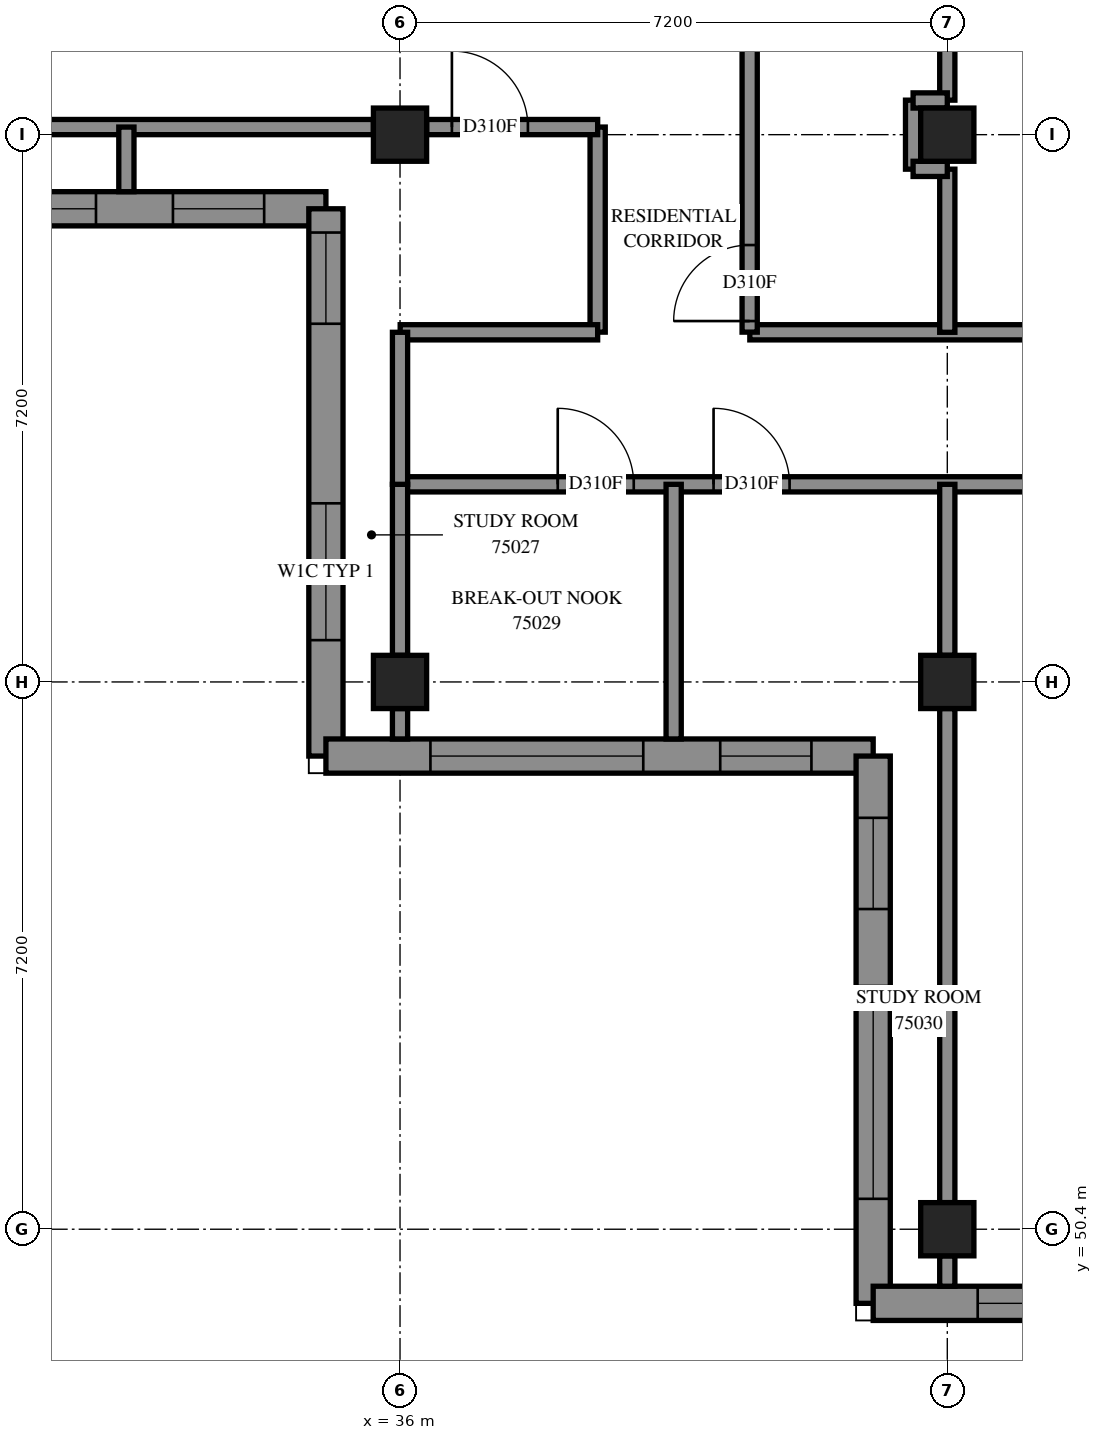
"""IFC4 building model, lengths in metres.
Left out: names, types, materials, properties, quantities, classifications, styles, units other than length and angle.
Written with IfcOpenShell. Run it as: python <this file> out.ifc"""

import sys

from ifc_helpers import new_model, si_unit, direction, frame, frame_2d, origin, origin_2d, place, context, subcontext, project, spatial, polyline, rectangle, outline, extrude, element, fill, save


model = new_model("IFC4")
c1 = context("Model", 3, precision=1e-05, world=origin(), true_north=direction((0.0, 1.0)))
c2 = subcontext(c1, "Body", "Model", "MODEL_VIEW")
j1 = project(units=[si_unit("LENGTHUNIT", "METRE"), si_unit("PLANEANGLEUNIT", "RADIAN")], contexts=[c1])
p1 = place(None, origin())
s1 = spatial("IfcSite", under=j1, at=p1, CompositionType="ELEMENT")
p2 = place(p1, origin())
s2 = spatial("IfcBuilding", under=s1, at=p2, CompositionType="ELEMENT")
p3 = place(p2, frame((0.0, 0.0, 274.4)))
s3 = spatial("IfcBuildingStorey", under=s2, at=p3, CompositionType="ELEMENT", Elevation=274.4)
for number, where, z_axis, x_axis in (
    (1, (36.0, 57.6, 0.0), (0.0, 0.0, 1.0), (1.0, 0.0, 0.0)),
    (2, (36.0, 64.8, 0.0), (0.0, 0.0, 1.0), (1.0, 0.0, 0.0)),
    (3, (43.2, 50.4, 0.0), (0.0, 0.0, 1.0), (1.0, 0.0, 0.0)),
    (4, (43.2, 57.6, 0.0), (0.0, 0.0, 1.0), (1.0, 0.0, 0.0)),
    (5, (43.2, 64.8, 0.0), (0.0, 0.0, 1.0), (1.0, 0.0, 0.0)),
):
    element("IfcColumn", number, at=place(p3, frame(where, z_axis=z_axis, x_axis=x_axis)), inside=s3, PredefinedType="COLUMN", context=c2, shape_type="SweptSolid", body=[
        extrude(rectangle(XDim=0.7, YDim=0.7, at=origin_2d()), origin(), (0.0, 0.0, 1.0), 3.1),
    ])
p4 = place(p3, frame((26.653, 63.825, 0.0), z_axis=(0.0, 0.0, 1.0), x_axis=(1.0, 0.0, 0.0)))
e6 = element("IfcWall", 6, at=p4, inside=s3, PredefinedType="SOLIDWALL", context=c2, shape_type="SweptSolid", body=[
    extrude(outline(polyline([(-0.225, -0.225), (8.147, -0.225), (8.597, 0.225), (0.225, 0.225), (-0.225, -0.225)])), origin(), (0.0, 0.0, 1.0), 3.1),
])
p5 = place(p4, frame((2.547, 0.0, 0.45)))
e7 = element("IfcOpeningElement", 7, at=p5, cuts=e6, PredefinedType="OPENING", context=c2, shape_type="SweptSolid", body=[
    extrude(rectangle(XDim=2.8, YDim=2.55, at=frame_2d((1.4, 1.275))), frame((0.0, 0.235, 0.0), z_axis=(0.0, -1.0, 0.0), x_axis=(1.0, 0.0, 0.0)), (0.0, 0.0, 1.0), 0.47),
])
p6 = place(p4, frame((0.686, 0.0, 0.45)))
e8 = element("IfcOpeningElement", 8, at=p6, cuts=e6, PredefinedType="OPENING", context=c2, shape_type="SweptSolid", body=[
    extrude(rectangle(XDim=1.2, YDim=2.55, at=frame_2d((0.6, 1.275))), frame((0.0, 0.235, 0.0), z_axis=(0.0, -1.0, 0.0), x_axis=(1.0, 0.0, 0.0)), (0.0, 0.0, 1.0), 0.47),
])
p7 = place(p4, frame((6.359, 0.0, 0.45)))
e9 = element("IfcOpeningElement", 9, at=p7, cuts=e6, PredefinedType="OPENING", context=c2, shape_type="SweptSolid", body=[
    extrude(rectangle(XDim=1.2, YDim=2.55, at=frame_2d((0.6, 1.275))), frame((0.0, 0.235, 0.0), z_axis=(0.0, -1.0, 0.0), x_axis=(1.0, 0.0, 0.0)), (0.0, 0.0, 1.0), 0.47),
])
p8 = place(p3, frame((35.025, 63.825, 0.0), z_axis=(0.0, 0.0, 1.0), x_axis=(0.0, -1.0, 0.0)))
e10 = element("IfcWall", 10, at=p8, inside=s3, PredefinedType="SOLIDWALL", context=c2, shape_type="SweptSolid", body=[
    extrude(outline(polyline([(0.225, -0.225), (7.425, -0.225), (6.975, 0.225), (-0.225, 0.225), (0.225, -0.225)])), origin(), (0.0, 0.0, 1.0), 3.1),
])
p9 = place(p8, frame((0.312, 0.0, 0.45)))
e11 = element("IfcOpeningElement", 11, at=p9, cuts=e10, PredefinedType="OPENING", context=c2, shape_type="SweptSolid", body=[
    extrude(rectangle(XDim=1.2, YDim=2.55, at=frame_2d((0.6, 1.275))), frame((0.0, 0.235, 0.0), z_axis=(0.0, -1.0, 0.0), x_axis=(1.0, 0.0, 0.0)), (0.0, 0.0, 1.0), 0.47),
])
p10 = place(p8, frame((3.875, 0.0, 0.7)))
e12 = element("IfcOpeningElement", 12, at=p10, cuts=e10, PredefinedType="OPENING", context=c2, shape_type="SweptSolid", body=[
    extrude(rectangle(XDim=1.8, YDim=2.3, at=frame_2d((0.9, 1.15))), frame((0.0, 0.235, 0.0), z_axis=(0.0, -1.0, 0.0), x_axis=(1.0, 0.0, 0.0)), (0.0, 0.0, 1.0), 0.47),
])
p11 = place(p3, frame((35.025, 56.625, 0.0), z_axis=(0.0, 0.0, 1.0), x_axis=(1.0, 0.0, 0.0)))
e13 = element("IfcWall", 13, at=p11, inside=s3, PredefinedType="SOLIDWALL", context=c2, shape_type="SweptSolid", body=[
    extrude(outline(polyline([(-0.225, -0.225), (6.975, -0.225), (7.425, 0.225), (0.225, 0.225), (-0.225, -0.225)])), origin(), (0.0, 0.0, 1.0), 3.1),
])
p12 = place(p11, frame((1.375, 0.0, 0.45)))
e14 = element("IfcOpeningElement", 14, at=p12, cuts=e13, PredefinedType="OPENING", context=c2, shape_type="SweptSolid", body=[
    extrude(rectangle(XDim=2.8, YDim=2.55, at=frame_2d((1.4, 1.275))), frame((0.0, 0.235, 0.0), z_axis=(0.0, -1.0, 0.0), x_axis=(1.0, 0.0, 0.0)), (0.0, 0.0, 1.0), 0.47),
])
p13 = place(p11, frame((5.188, 0.0, 0.45)))
e15 = element("IfcOpeningElement", 15, at=p13, cuts=e13, PredefinedType="OPENING", context=c2, shape_type="SweptSolid", body=[
    extrude(rectangle(XDim=1.2, YDim=2.55, at=frame_2d((0.6, 1.275))), frame((0.0, 0.235, 0.0), z_axis=(0.0, -1.0, 0.0), x_axis=(1.0, 0.0, 0.0)), (0.0, 0.0, 1.0), 0.47),
])
p14 = place(p3, frame((42.225, 56.625, 0.0), z_axis=(0.0, 0.0, 1.0), x_axis=(0.0, -1.0, 0.0)))
e16 = element("IfcWall", 16, at=p14, inside=s3, PredefinedType="SOLIDWALL", context=c2, shape_type="SweptSolid", body=[
    extrude(outline(polyline([(0.225, -0.225), (7.425, -0.225), (6.975, 0.225), (-0.225, 0.225), (0.225, -0.225)])), origin(), (0.0, 0.0, 1.0), 3.1),
])
p15 = place(p14, frame((3.025, 0.0, 0.45)))
e17 = element("IfcOpeningElement", 17, at=p15, cuts=e16, PredefinedType="OPENING", context=c2, shape_type="SweptSolid", body=[
    extrude(rectangle(XDim=2.8, YDim=2.55, at=frame_2d((1.4, 1.275))), frame((0.0, 0.235, 0.0), z_axis=(0.0, -1.0, 0.0), x_axis=(1.0, 0.0, 0.0)), (0.0, 0.0, 1.0), 0.47),
])
p16 = place(p14, frame((0.812, 0.0, 0.45)))
e18 = element("IfcOpeningElement", 18, at=p16, cuts=e16, PredefinedType="OPENING", context=c2, shape_type="SweptSolid", body=[
    extrude(rectangle(XDim=1.2, YDim=2.55, at=frame_2d((0.6, 1.275))), frame((0.0, 0.235, 0.0), z_axis=(0.0, -1.0, 0.0), x_axis=(1.0, 0.0, 0.0)), (0.0, 0.0, 1.0), 0.47),
])
p17 = place(p3, frame((42.225, 49.425, 0.0), z_axis=(0.0, 0.0, 1.0), x_axis=(1.0, 0.0, 0.0)))
e19 = element("IfcWall", 19, at=p17, inside=s3, PredefinedType="SOLIDWALL", context=c2, shape_type="SweptSolid", body=[
    extrude(outline(polyline([(-0.225, -0.225), (6.975, -0.225), (7.425, 0.225), (0.225, 0.225), (-0.225, -0.225)])), origin(), (0.0, 0.0, 1.0), 3.1),
])
p18 = place(p17, frame((1.375, 0.0, 0.45)))
e20 = element("IfcOpeningElement", 20, at=p18, cuts=e19, PredefinedType="OPENING", context=c2, shape_type="SweptSolid", body=[
    extrude(rectangle(XDim=2.8, YDim=2.55, at=frame_2d((1.4, 1.275))), frame((0.0, 0.235, 0.0), z_axis=(0.0, -1.0, 0.0), x_axis=(1.0, 0.0, 0.0)), (0.0, 0.0, 1.0), 0.47),
])
p19 = place(p17, frame((5.188, 0.0, 0.45)))
e21 = element("IfcOpeningElement", 21, at=p19, cuts=e19, PredefinedType="OPENING", context=c2, shape_type="SweptSolid", body=[
    extrude(rectangle(XDim=1.2, YDim=2.55, at=frame_2d((0.6, 1.275))), frame((0.0, 0.235, 0.0), z_axis=(0.0, -1.0, 0.0), x_axis=(1.0, 0.0, 0.0)), (0.0, 0.0, 1.0), 0.47),
])
p20 = place(p3, frame((36.0, 60.2, 0.0), z_axis=(0.0, 0.0, 1.0), x_axis=(1.0, 0.0, 0.0)))
e22 = element("IfcWall", 22, at=p20, inside=s3, PredefinedType="PARTITIONING", context=c2, shape_type="SweptSolid", body=[
    extrude(rectangle(XDim=17.0, YDim=0.2, at=frame_2d((8.5, 0.0))), origin(), (0.0, 0.0, 1.0), 3.1),
])
p21 = place(p20, frame((15.802, 0.0, 0.0)))
e23 = element("IfcOpeningElement", 23, at=p21, cuts=e22, PredefinedType="OPENING", context=c2, shape_type="SweptSolid", body=[
    extrude(rectangle(XDim=1.0, YDim=2.1, at=frame_2d((0.5, 1.05))), frame((0.0, 0.11, 0.0), z_axis=(0.0, -1.0, 0.0), x_axis=(1.0, 0.0, 0.0)), (0.0, 0.0, 1.0), 0.22),
])
p22 = place(p20, frame((2.075, 0.0, 0.0)))
e24 = element("IfcOpeningElement", 24, at=p22, cuts=e22, PredefinedType="OPENING", context=c2, shape_type="SweptSolid", body=[
    extrude(rectangle(XDim=1.0, YDim=2.1, at=frame_2d((0.5, 1.05))), frame((0.0, 0.11, 0.0), z_axis=(0.0, -1.0, 0.0), x_axis=(1.0, 0.0, 0.0)), (0.0, 0.0, 1.0), 0.22),
])
p23 = place(p20, frame((4.125, 0.0, 0.0)))
e25 = element("IfcOpeningElement", 25, at=p23, cuts=e22, PredefinedType="OPENING", context=c2, shape_type="SweptSolid", body=[
    extrude(rectangle(XDim=1.0, YDim=2.1, at=frame_2d((0.5, 1.05))), frame((0.0, 0.11, 0.0), z_axis=(0.0, -1.0, 0.0), x_axis=(1.0, 0.0, 0.0)), (0.0, 0.0, 1.0), 0.22),
])
p24 = place(p20, frame((9.275, 0.0, 0.0)))
e26 = element("IfcOpeningElement", 26, at=p24, cuts=e22, PredefinedType="OPENING", context=c2, shape_type="SweptSolid", body=[
    extrude(rectangle(XDim=1.0, YDim=2.1, at=frame_2d((0.5, 1.05))), frame((0.0, 0.11, 0.0), z_axis=(0.0, -1.0, 0.0), x_axis=(1.0, 0.0, 0.0)), (0.0, 0.0, 1.0), 0.22),
])
p25 = place(p20, frame((11.48, 0.0, 0.0)))
e27 = element("IfcOpeningElement", 27, at=p25, cuts=e22, PredefinedType="OPENING", context=c2, shape_type="SweptSolid", body=[
    extrude(rectangle(XDim=1.0, YDim=2.1, at=frame_2d((0.5, 1.05))), frame((0.0, 0.11, 0.0), z_axis=(0.0, -1.0, 0.0), x_axis=(1.0, 0.0, 0.0)), (0.0, 0.0, 1.0), 0.22),
])
p26 = place(p3, frame((40.602, 62.2, 0.0), z_axis=(0.0, 0.0, 1.0), x_axis=(1.0, 0.0, 0.0)))
e28 = element("IfcWall", 28, at=p26, inside=s3, PredefinedType="PARTITIONING", context=c2, shape_type="SweptSolid", body=[
    extrude(rectangle(XDim=9.798, YDim=0.2, at=frame_2d((4.899, 0.0))), origin(), (0.0, 0.0, 1.0), 3.1),
])
p27 = place(p26, frame((6.446, 0.0, 0.0)))
e29 = element("IfcOpeningElement", 29, at=p27, cuts=e28, PredefinedType="OPENING", context=c2, shape_type="SweptSolid", body=[
    extrude(rectangle(XDim=1.0, YDim=2.1, at=frame_2d((0.5, 1.05))), frame((0.0, 0.11, 0.0), z_axis=(0.0, -1.0, 0.0), x_axis=(1.0, 0.0, 0.0)), (0.0, 0.0, 1.0), 0.22),
])
for number, where, z_axis, x_axis in (
    (30, (29.15, 64.9, 0.0), (0.0, 0.0, 1.0), (1.0, 0.0, 0.0)),
    (31, (43.2, 50.75, 0.0), (0.0, 0.0, 1.0), (0.0, 1.0, 0.0)),
):
    element("IfcWall", number, at=place(p3, frame(where, z_axis=z_axis, x_axis=x_axis)), inside=s3, PredefinedType="PARTITIONING", context=c2, shape_type="SweptSolid", body=[
        extrude(rectangle(XDim=6.5, YDim=0.2, at=frame_2d((3.25, 0.0))), origin(), (0.0, 0.0, 1.0), 2.6),
    ])
p28 = place(p3, frame((43.2, 65.254, 0.0), z_axis=(0.0, 0.0, 1.0), x_axis=(0.0, 1.0, 0.0)))
e32 = element("IfcWall", 32, at=p28, inside=s3, PredefinedType="PARTITIONING", context=c2, shape_type="SweptSolid", body=[
    extrude(rectangle(XDim=6.292, YDim=0.2, at=frame_2d((3.146, 0.0))), origin(), (0.0, 0.0, 1.0), 3.1),
])
p29 = place(p3, frame((40.6, 62.202, 0.0), z_axis=(0.0, 0.0, 1.0), x_axis=(0.0, 1.0, 0.0)))
e33 = element("IfcWall", 33, at=p29, inside=s3, PredefinedType="PARTITIONING", context=c2, shape_type="SweptSolid", body=[
    extrude(rectangle(XDim=4.698, YDim=0.2, at=frame_2d((2.349, 0.0))), origin(), (0.0, 0.0, 1.0), 3.1),
])
p30 = place(p29, frame((0.146, 0.0, 0.0)))
e34 = element("IfcOpeningElement", 34, at=p30, cuts=e33, PredefinedType="OPENING", context=c2, shape_type="SweptSolid", body=[
    extrude(rectangle(XDim=1.0, YDim=2.1, at=frame_2d((0.5, 1.05))), frame((0.0, 0.11, 0.0), z_axis=(0.0, -1.0, 0.0), x_axis=(1.0, 0.0, 0.0)), (0.0, 0.0, 1.0), 0.22),
])
p31 = place(p3, frame((39.6, 56.85, 0.0), z_axis=(0.0, 0.0, 1.0), x_axis=(0.0, 1.0, 0.0)))
e35 = element("IfcWall", 35, at=p31, inside=s3, PredefinedType="PARTITIONING", context=c2, shape_type="SweptSolid", body=[
    extrude(rectangle(XDim=3.35, YDim=0.2, at=frame_2d((1.675, 0.0))), origin(), (0.0, 0.0, 1.0), 3.1),
])
p32 = place(p3, frame((38.6, 62.202, 0.0), z_axis=(0.0, 0.0, 1.0), x_axis=(0.0, 1.0, 0.0)))
e36 = element("IfcWall", 36, at=p32, inside=s3, PredefinedType="PARTITIONING", context=c2, shape_type="SweptSolid", body=[
    extrude(rectangle(XDim=2.698, YDim=0.2, at=frame_2d((1.349, 0.0))), origin(), (0.0, 0.0, 1.0), 3.1),
])
p33 = place(p3, frame((36.002, 62.2, 0.0), z_axis=(0.0, 0.0, 1.0), x_axis=(1.0, 0.0, 0.0)))
e37 = element("IfcWall", 37, at=p33, inside=s3, PredefinedType="PARTITIONING", context=c2, shape_type="SweptSolid", body=[
    extrude(rectangle(XDim=2.598, YDim=0.2, at=frame_2d((1.299, 0.0))), origin(), (0.0, 0.0, 1.0), 3.1),
])
p34 = place(p3, frame((36.35, 64.9, 0.0), z_axis=(0.0, 0.0, 1.0), x_axis=(1.0, 0.0, 0.0)))
e38 = element("IfcWall", 38, at=p34, inside=s3, PredefinedType="PARTITIONING", context=c2, shape_type="SweptSolid", body=[
    extrude(rectangle(XDim=2.25, YDim=0.2, at=frame_2d((1.125, 0.0))), origin(), (0.0, 0.0, 1.0), 3.1),
])
p35 = place(p34, frame((0.333, 0.0, 0.0)))
e39 = element("IfcOpeningElement", 39, at=p35, cuts=e38, PredefinedType="OPENING", context=c2, shape_type="SweptSolid", body=[
    extrude(rectangle(XDim=1.0, YDim=2.1, at=frame_2d((0.5, 1.05))), frame((0.0, 0.11, 0.0), z_axis=(0.0, -1.0, 0.0), x_axis=(1.0, 0.0, 0.0)), (0.0, 0.0, 1.0), 0.22),
])
p36 = place(p3, frame((36.0, 57.95, 0.0), z_axis=(0.0, 0.0, 1.0), x_axis=(0.0, 1.0, 0.0)))
e40 = element("IfcWall", 40, at=p36, inside=s3, PredefinedType="PARTITIONING", context=c2, shape_type="SweptSolid", body=[
    extrude(rectangle(XDim=2.25, YDim=0.2, at=frame_2d((1.125, 0.0))), origin(), (0.0, 0.0, 1.0), 2.6),
])
p37 = place(p3, frame((43.2, 57.95, 0.0), z_axis=(0.0, 0.0, 1.0), x_axis=(0.0, 1.0, 0.0)))
e41 = element("IfcWall", 41, at=p37, inside=s3, PredefinedType="PARTITIONING", context=c2, shape_type="SweptSolid", body=[
    extrude(rectangle(XDim=2.25, YDim=0.2, at=frame_2d((1.125, 0.0))), origin(), (0.0, 0.0, 1.0), 3.1),
])
p38 = place(p3, frame((43.2, 62.2, 0.0), z_axis=(0.0, 0.0, 1.0), x_axis=(0.0, 1.0, 0.0)))
e42 = element("IfcWall", 42, at=p38, inside=s3, PredefinedType="PARTITIONING", context=c2, shape_type="SweptSolid", body=[
    extrude(rectangle(XDim=2.146, YDim=0.2, at=frame_2d((1.073, 0.0))), origin(), (0.0, 0.0, 1.0), 3.1),
])
p39 = place(p3, frame((36.0, 60.2, 0.0), z_axis=(0.0, 0.0, 1.0), x_axis=(0.0, 1.0, 0.0)))
e43 = element("IfcWall", 43, at=p39, inside=s3, PredefinedType="PARTITIONING", context=c2, shape_type="SweptSolid", body=[
    extrude(rectangle(XDim=2.0, YDim=0.2, at=frame_2d((1.0, 0.0))), origin(), (0.0, 0.0, 1.0), 2.6),
])
p40 = place(p3, frame((42.75, 64.346, 0.0), z_axis=(0.0, 0.0, 1.0), x_axis=(0.0, 1.0, 0.0)))
e44 = element("IfcWall", 44, at=p40, inside=s3, PredefinedType="PARTITIONING", context=c2, shape_type="SweptSolid", body=[
    extrude(rectangle(XDim=0.908, YDim=0.2, at=frame_2d((0.454, 0.0))), origin(), (0.0, 0.0, 1.0), 3.1),
])
p41 = place(p3, frame((32.4, 64.05, 0.0), z_axis=(0.0, 0.0, 1.0), x_axis=(0.0, 1.0, 0.0)))
e45 = element("IfcWall", 45, at=p41, inside=s3, PredefinedType="PARTITIONING", context=c2, shape_type="SweptSolid", body=[
    extrude(rectangle(XDim=0.85, YDim=0.2, at=frame_2d((0.425, 0.0))), origin(), (0.0, 0.0, 1.0), 3.1),
])
for number, where, z_axis, x_axis in (
    (46, (42.75, 65.25, 0.0), (0.0, 0.0, 1.0), (1.0, 0.0, 0.0)),
    (47, (42.75, 64.35, 0.0), (0.0, 0.0, 1.0), (1.0, 0.0, 0.0)),
):
    element("IfcWall", number, at=place(p3, frame(where, z_axis=z_axis, x_axis=x_axis)), inside=s3, PredefinedType="PARTITIONING", context=c2, shape_type="SweptSolid", body=[
        extrude(rectangle(XDim=0.45, YDim=0.2, at=frame_2d((0.225, 0.0))), origin(), (0.0, 0.0, 1.0), 3.1),
    ])
for number, where, z_axis, x_axis in (
    (48, (36.0, 56.85, 0.0), (0.0, 0.0, 1.0), (0.0, 1.0, 0.0)),
    (49, (43.2, 49.65, 0.0), (0.0, 0.0, 1.0), (0.0, 1.0, 0.0)),
):
    element("IfcWall", number, at=place(p3, frame(where, z_axis=z_axis, x_axis=x_axis)), inside=s3, PredefinedType="PARTITIONING", context=c2, shape_type="SweptSolid", body=[
        extrude(rectangle(XDim=0.4, YDim=0.2, at=frame_2d((0.2, 0.0))), origin(), (0.0, 0.0, 1.0), 3.1),
    ])
p42 = place(p5, origin())
e50 = element("IfcWindow", 50, at=p42, inside=s3, PartitioningType="SINGLE_PANEL", PredefinedType="WINDOW", context=c2, shape_type="SweptSolid", body=[
    extrude(rectangle(XDim=2.8, YDim=2.55, at=frame_2d((1.4, 1.275))), frame((0.0, 0.205, 0.0), z_axis=(0.0, -1.0, 0.0), x_axis=(1.0, 0.0, 0.0)), (0.0, 0.0, 1.0), 0.06),
])
fill(e7, e50)
p43 = place(p7, origin())
e51 = element("IfcWindow", 51, at=p43, inside=s3, PartitioningType="SINGLE_PANEL", PredefinedType="WINDOW", context=c2, shape_type="SweptSolid", body=[
    extrude(rectangle(XDim=1.2, YDim=2.55, at=frame_2d((0.6, 1.275))), frame((0.0, 0.205, 0.0), z_axis=(0.0, -1.0, 0.0), x_axis=(1.0, 0.0, 0.0)), (0.0, 0.0, 1.0), 0.06),
])
fill(e9, e51)
p44 = place(p9, origin())
e52 = element("IfcWindow", 52, at=p44, inside=s3, PartitioningType="SINGLE_PANEL", PredefinedType="WINDOW", context=c2, shape_type="SweptSolid", body=[
    extrude(rectangle(XDim=1.2, YDim=2.55, at=frame_2d((0.6, 1.275))), frame((0.0, 0.205, 0.0), z_axis=(0.0, -1.0, 0.0), x_axis=(1.0, 0.0, 0.0)), (0.0, 0.0, 1.0), 0.06),
])
fill(e11, e52)
p45 = place(p12, origin())
e53 = element("IfcWindow", 53, at=p45, inside=s3, PartitioningType="SINGLE_PANEL", PredefinedType="WINDOW", context=c2, shape_type="SweptSolid", body=[
    extrude(rectangle(XDim=2.8, YDim=2.55, at=frame_2d((1.4, 1.275))), frame((0.0, 0.205, 0.0), z_axis=(0.0, -1.0, 0.0), x_axis=(1.0, 0.0, 0.0)), (0.0, 0.0, 1.0), 0.06),
])
fill(e14, e53)
p46 = place(p13, origin())
e54 = element("IfcWindow", 54, at=p46, inside=s3, PartitioningType="SINGLE_PANEL", PredefinedType="WINDOW", context=c2, shape_type="SweptSolid", body=[
    extrude(rectangle(XDim=1.2, YDim=2.55, at=frame_2d((0.6, 1.275))), frame((0.0, 0.205, 0.0), z_axis=(0.0, -1.0, 0.0), x_axis=(1.0, 0.0, 0.0)), (0.0, 0.0, 1.0), 0.06),
])
fill(e15, e54)
p47 = place(p15, origin())
e55 = element("IfcWindow", 55, at=p47, inside=s3, PartitioningType="SINGLE_PANEL", PredefinedType="WINDOW", context=c2, shape_type="SweptSolid", body=[
    extrude(rectangle(XDim=2.8, YDim=2.55, at=frame_2d((1.4, 1.275))), frame((0.0, 0.205, 0.0), z_axis=(0.0, -1.0, 0.0), x_axis=(1.0, 0.0, 0.0)), (0.0, 0.0, 1.0), 0.06),
])
fill(e17, e55)
p48 = place(p16, origin())
e56 = element("IfcWindow", 56, at=p48, inside=s3, PartitioningType="SINGLE_PANEL", PredefinedType="WINDOW", context=c2, shape_type="SweptSolid", body=[
    extrude(rectangle(XDim=1.2, YDim=2.55, at=frame_2d((0.6, 1.275))), frame((0.0, 0.205, 0.0), z_axis=(0.0, -1.0, 0.0), x_axis=(1.0, 0.0, 0.0)), (0.0, 0.0, 1.0), 0.06),
])
fill(e18, e56)
p49 = place(p18, origin())
e57 = element("IfcWindow", 57, at=p49, inside=s3, PartitioningType="SINGLE_PANEL", PredefinedType="WINDOW", context=c2, shape_type="SweptSolid", body=[
    extrude(rectangle(XDim=2.8, YDim=2.55, at=frame_2d((1.4, 1.275))), frame((0.0, 0.205, 0.0), z_axis=(0.0, -1.0, 0.0), x_axis=(1.0, 0.0, 0.0)), (0.0, 0.0, 1.0), 0.06),
])
fill(e20, e57)
p50 = place(p35, origin())
e58 = element("IfcDoor", 58, at=p50, inside=s3, OperationType="SINGLE_SWING_RIGHT", PredefinedType="DOOR", context=c2, shape_type="SweptSolid", body=[
    extrude(rectangle(XDim=1.0, YDim=2.1, at=frame_2d((0.5, 1.05))), frame((0.0, 0.025, 0.0), z_axis=(0.0, -1.0, 0.0), x_axis=(1.0, 0.0, 0.0)), (0.0, 0.0, 1.0), 0.05),
])
fill(e39, e58)
p51 = place(p22, origin())
e59 = element("IfcDoor", 59, at=p51, inside=s3, OperationType="SINGLE_SWING_LEFT", PredefinedType="DOOR", context=c2, shape_type="SweptSolid", body=[
    extrude(rectangle(XDim=1.0, YDim=2.1, at=frame_2d((0.5, 1.05))), frame((0.0, 0.025, 0.0), z_axis=(0.0, -1.0, 0.0), x_axis=(1.0, 0.0, 0.0)), (0.0, 0.0, 1.0), 0.05),
])
fill(e24, e59)
p52 = place(p23, origin())
e60 = element("IfcDoor", 60, at=p52, inside=s3, OperationType="SINGLE_SWING_RIGHT", PredefinedType="DOOR", context=c2, shape_type="SweptSolid", body=[
    extrude(rectangle(XDim=1.0, YDim=2.1, at=frame_2d((0.5, 1.05))), frame((0.0, 0.025, 0.0), z_axis=(0.0, -1.0, 0.0), x_axis=(1.0, 0.0, 0.0)), (0.0, 0.0, 1.0), 0.05),
])
fill(e25, e60)
p53 = place(p30, origin())
e61 = element("IfcDoor", 61, at=p53, inside=s3, OperationType="SINGLE_SWING_LEFT", PredefinedType="DOOR", context=c2, shape_type="SweptSolid", body=[
    extrude(rectangle(XDim=1.0, YDim=2.1, at=frame_2d((0.5, 1.05))), frame((0.0, 0.025, 0.0), z_axis=(0.0, -1.0, 0.0), x_axis=(1.0, 0.0, 0.0)), (0.0, 0.0, 1.0), 0.05),
])
fill(e34, e61)
p54 = place(p10, origin())
e62 = element("IfcWindow", 62, at=p54, inside=s3, PartitioningType="SINGLE_PANEL", PredefinedType="WINDOW", context=c2, shape_type="SweptSolid", body=[
    extrude(rectangle(XDim=1.8, YDim=2.3, at=frame_2d((0.9, 1.15))), frame((0.0, 0.205, 0.0), z_axis=(0.0, -1.0, 0.0), x_axis=(1.0, 0.0, 0.0)), (0.0, 0.0, 1.0), 0.06),
])
fill(e12, e62)
save(model, sys.argv[1])
